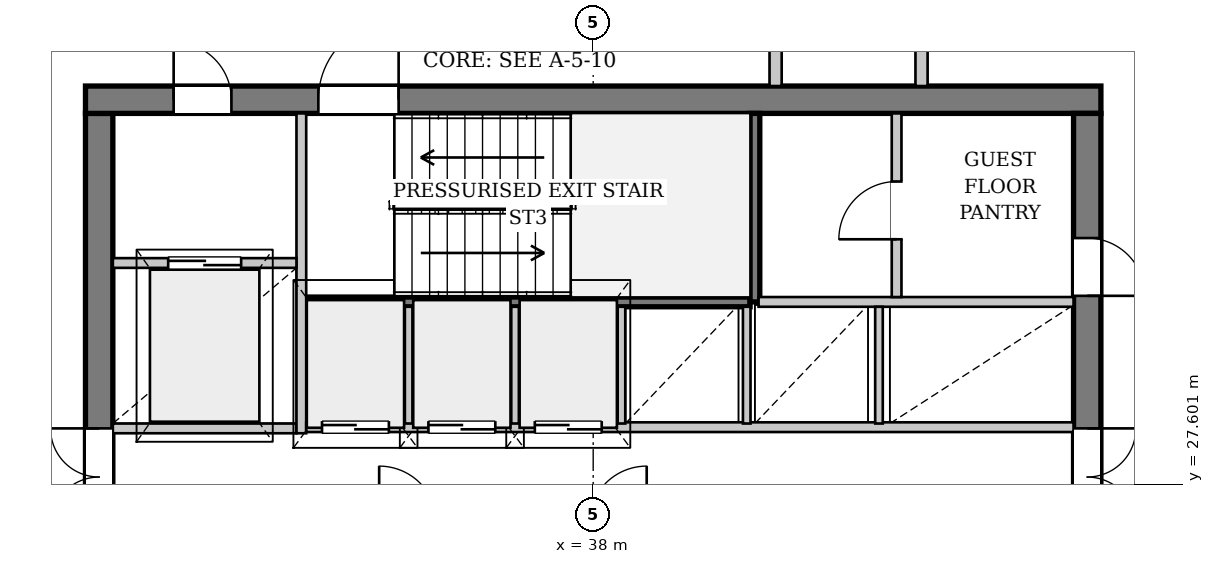
"""IFC4 building model, lengths in metres.
Left out: names, types, materials, properties, quantities, classifications, styles, units other than length and angle.
Written with IfcOpenShell. Run it as: python <this file> out.ifc"""

import sys

from ifc_helpers import new_model, si_unit, direction, frame, frame_2d, origin, place, context, subcontext, project, spatial, rectangle, extrude, source, transform, mapped, element, fill, save


model = new_model("IFC4")
c1 = context("Model", 3, precision=1e-05, world=origin(), true_north=direction((0.0, 1.0)))
c2 = subcontext(c1, "Body", "Model", "MODEL_VIEW")
j1 = project(units=[si_unit("LENGTHUNIT", "METRE"), si_unit("PLANEANGLEUNIT", "RADIAN")], contexts=[c1])
p1 = place(None, origin())
s1 = spatial("IfcSite", under=j1, at=p1, CompositionType="ELEMENT")
p2 = place(p1, origin())
s2 = spatial("IfcBuilding", under=s1, at=p2, CompositionType="ELEMENT")
p3 = place(p2, frame((0.0, 0.0, 230.9)))
s3 = spatial("IfcBuildingStorey", under=s2, at=p3, CompositionType="ELEMENT", Elevation=230.9)
p4 = place(p3, frame((15.504, 30.396, 0.0), z_axis=(0.0, 0.0, 1.0), x_axis=(0.869398698509, 0.494111225365, 0.0)))
e1 = element("IfcWall", 1, at=p4, inside=s3, PredefinedType="SOLIDWALL", context=c2, shape_type="SweptSolid", body=[
    extrude(rectangle(XDim=22.369, YDim=0.38, at=frame_2d((11.185, 0.0))), origin(), (0.0, 0.0, 1.0), 2.872),
])
p5 = place(p4, frame((5.163, 0.0, 0.502)))
e2 = element("IfcOpeningElement", 2, at=p5, cuts=e1, PredefinedType="OPENING", context=c2, shape_type="SweptSolid", body=[
    extrude(rectangle(XDim=2.2, YDim=2.25, at=frame_2d((1.1, 1.125))), frame((0.0, 0.2, 0.0), z_axis=(0.0, -1.0, 0.0), x_axis=(1.0, 0.0, 0.0)), (0.0, 0.0, 1.0), 0.4),
])
p6 = place(p4, frame((15.206, 0.0, 0.502)))
e3 = element("IfcOpeningElement", 3, at=p6, cuts=e1, PredefinedType="OPENING", context=c2, shape_type="SweptSolid", body=[
    extrude(rectangle(XDim=2.2, YDim=2.25, at=frame_2d((1.1, 1.125))), frame((0.0, 0.2, 0.0), z_axis=(0.0, -1.0, 0.0), x_axis=(1.0, 0.0, 0.0)), (0.0, 0.0, 1.0), 0.4),
])
p7 = place(p3, frame((29.875, 19.5, 0.0), z_axis=(0.0, 0.0, 1.0), x_axis=(0.0, 1.0, 0.0)))
e4 = element("IfcWall", 4, at=p7, inside=s3, PredefinedType="SHEAR", context=c2, shape_type="SweptSolid", body=[
    extrude(rectangle(XDim=14.2, YDim=0.45, at=frame_2d((7.1, 0.0))), origin(), (0.0, 0.0, 1.0), 3.38),
])
p8 = place(p7, frame((7.42, 0.0, 0.0)))
e5 = element("IfcOpeningElement", 5, at=p8, cuts=e4, PredefinedType="OPENING", context=c2, shape_type="SweptSolid", body=[
    extrude(rectangle(XDim=1.6, YDim=2.2, at=frame_2d((0.8, 1.1))), frame((0.0, 0.235, 0.0), z_axis=(0.0, -1.0, 0.0), x_axis=(1.0, 0.0, 0.0)), (0.0, 0.0, 1.0), 0.47),
])
p9 = place(p3, frame((29.65, 33.925, 0.0), z_axis=(0.0, 0.0, 1.0), x_axis=(1.0, 0.0, 0.0)))
e6 = element("IfcWall", 6, at=p9, inside=s3, PredefinedType="SHEAR", context=c2, shape_type="SweptSolid", body=[
    extrude(rectangle(XDim=16.7, YDim=0.45, at=frame_2d((8.35, 0.0))), origin(), (0.0, 0.0, 1.0), 3.38),
])
p10 = place(p9, frame((1.45, 0.0, 0.0)))
e7 = element("IfcOpeningElement", 7, at=p10, cuts=e6, PredefinedType="OPENING", context=c2, shape_type="SweptSolid", body=[
    extrude(rectangle(XDim=0.95, YDim=2.1, at=frame_2d((0.475, 1.05))), frame((0.0, 0.235, 0.0), z_axis=(0.0, -1.0, 0.0), x_axis=(1.0, 0.0, 0.0)), (0.0, 0.0, 1.0), 0.47),
])
p11 = place(p9, frame((3.83, 0.0, 0.0)))
e8 = element("IfcOpeningElement", 8, at=p11, cuts=e6, PredefinedType="OPENING", context=c2, shape_type="SweptSolid", body=[
    extrude(rectangle(XDim=1.32, YDim=2.2, at=frame_2d((0.66, 1.1))), frame((0.0, 0.235, 0.0), z_axis=(0.0, -1.0, 0.0), x_axis=(1.0, 0.0, 0.0)), (0.0, 0.0, 1.0), 0.47),
])
p12 = place(p3, frame((46.125, 33.7, 0.0), z_axis=(0.0, 0.0, 1.0), x_axis=(0.0, -1.0, 0.0)))
e9 = element("IfcWall", 9, at=p12, inside=s3, PredefinedType="SHEAR", context=c2, shape_type="SweptSolid", body=[
    extrude(rectangle(XDim=14.2, YDim=0.45, at=frame_2d((7.1, 0.0))), origin(), (0.0, 0.0, 1.0), 3.38),
])
p13 = place(p12, frame((5.18, 0.0, 0.0)))
e10 = element("IfcOpeningElement", 10, at=p13, cuts=e9, PredefinedType="OPENING", context=c2, shape_type="SweptSolid", body=[
    extrude(rectangle(XDim=1.6, YDim=2.2, at=frame_2d((0.8, 1.1))), frame((0.0, 0.235, 0.0), z_axis=(0.0, -1.0, 0.0), x_axis=(1.0, 0.0, 0.0)), (0.0, 0.0, 1.0), 0.47),
])
p14 = place(p12, frame((2.05, 0.0, 0.0)))
e11 = element("IfcOpeningElement", 11, at=p14, cuts=e9, PredefinedType="OPENING", context=c2, shape_type="SweptSolid", body=[
    extrude(rectangle(XDim=0.95, YDim=2.1, at=frame_2d((0.475, 1.05))), frame((0.0, 0.235, 0.0), z_axis=(0.0, -1.0, 0.0), x_axis=(1.0, 0.0, 0.0)), (0.0, 0.0, 1.0), 0.47),
])
p15 = place(p3, frame((33.28, 30.6, 0.0), z_axis=(0.0, 0.0, 1.0), x_axis=(1.0, 0.0, 0.0)))
e12 = element("IfcWall", 12, at=p15, inside=s3, PredefinedType="PARTITIONING", context=c2, shape_type="SweptSolid", body=[
    extrude(rectangle(XDim=7.3, YDim=0.16, at=frame_2d((3.65, 0.0))), origin(), (0.0, 0.0, 1.0), 3.38),
])
p16 = place(p3, frame((40.66, 30.6, 0.0), z_axis=(0.0, 0.0, 1.0), x_axis=(0.0, 1.0, 0.0)))
e13 = element("IfcWall", 13, at=p16, inside=s3, PredefinedType="PARTITIONING", context=c2, shape_type="SweptSolid", body=[
    extrude(rectangle(XDim=3.1, YDim=0.16, at=frame_2d((1.55, 0.0))), origin(), (0.0, 0.0, 1.0), 3.38),
])
p17 = place(p3, frame((30.1, 28.52, 0.0), z_axis=(0.0, 0.0, 1.0), x_axis=(1.0, 0.0, 0.0)))
e14 = element("IfcWall", 14, at=p17, inside=s3, PredefinedType="PARTITIONING", context=c2, shape_type="SweptSolid", body=[
    extrude(rectangle(XDim=3.02, YDim=0.16, at=frame_2d((1.51, 0.0))), origin(), (0.0, 0.0, 1.0), 3.38),
])
p18 = place(p3, frame((33.2, 28.44, 0.0), z_axis=(0.0, 0.0, 1.0), x_axis=(0.0, 1.0, 0.0)))
e15 = element("IfcWall", 15, at=p18, inside=s3, PredefinedType="PARTITIONING", context=c2, shape_type="SweptSolid", body=[
    extrude(rectangle(XDim=5.26, YDim=0.16, at=frame_2d((2.63, 0.0))), origin(), (0.0, 0.0, 1.0), 3.38),
])
p19 = place(p3, frame((30.1, 31.24, 0.0), z_axis=(0.0, 0.0, 1.0), x_axis=(1.0, 0.0, 0.0)))
e16 = element("IfcWall", 16, at=p19, inside=s3, PredefinedType="PARTITIONING", context=c2, shape_type="SweptSolid", body=[
    extrude(rectangle(XDim=3.02, YDim=0.16, at=frame_2d((1.51, 0.0))), origin(), (0.0, 0.0, 1.0), 3.38),
])
p20 = place(p19, frame((0.91, 0.0, 0.0)))
e17 = element("IfcOpeningElement", 17, at=p20, cuts=e16, PredefinedType="OPENING", context=c2, shape_type="SweptSolid", body=[
    extrude(rectangle(XDim=1.2, YDim=2.2, at=frame_2d((0.6, 1.1))), frame((0.0, 0.09, 0.0), z_axis=(0.0, -1.0, 0.0), x_axis=(1.0, 0.0, 0.0)), (0.0, 0.0, 1.0), 0.18),
])
p21 = place(p3, frame((33.28, 28.54, 0.0), z_axis=(0.0, 0.0, 1.0), x_axis=(1.0, 0.0, 0.0)))
e18 = element("IfcWall", 18, at=p21, inside=s3, PredefinedType="PARTITIONING", context=c2, shape_type="SweptSolid", body=[
    extrude(rectangle(XDim=12.62, YDim=0.16, at=frame_2d((6.31, 0.0))), origin(), (0.0, 0.0, 1.0), 3.38),
])
p22 = place(p21, frame((0.26, 0.0, 0.0)))
e19 = element("IfcOpeningElement", 19, at=p22, cuts=e18, PredefinedType="OPENING", context=c2, shape_type="SweptSolid", body=[
    extrude(rectangle(XDim=1.1, YDim=2.2, at=frame_2d((0.55, 1.1))), frame((0.0, 0.09, 0.0), z_axis=(0.0, -1.0, 0.0), x_axis=(1.0, 0.0, 0.0)), (0.0, 0.0, 1.0), 0.18),
])
p23 = place(p21, frame((2.01, 0.0, 0.0)))
e20 = element("IfcOpeningElement", 20, at=p23, cuts=e18, PredefinedType="OPENING", context=c2, shape_type="SweptSolid", body=[
    extrude(rectangle(XDim=1.1, YDim=2.2, at=frame_2d((0.55, 1.1))), frame((0.0, 0.09, 0.0), z_axis=(0.0, -1.0, 0.0), x_axis=(1.0, 0.0, 0.0)), (0.0, 0.0, 1.0), 0.18),
])
p24 = place(p21, frame((3.76, 0.0, 0.0)))
e21 = element("IfcOpeningElement", 21, at=p24, cuts=e18, PredefinedType="OPENING", context=c2, shape_type="SweptSolid", body=[
    extrude(rectangle(XDim=1.1, YDim=2.2, at=frame_2d((0.55, 1.1))), frame((0.0, 0.09, 0.0), z_axis=(0.0, -1.0, 0.0), x_axis=(1.0, 0.0, 0.0)), (0.0, 0.0, 1.0), 0.18),
])
p25 = place(p3, frame((40.72, 30.6, 0.0), z_axis=(0.0, 0.0, 1.0), x_axis=(1.0, 0.0, 0.0)))
e22 = element("IfcWall", 22, at=p25, inside=s3, PredefinedType="PARTITIONING", context=c2, shape_type="SweptSolid", body=[
    extrude(rectangle(XDim=5.18, YDim=0.16, at=frame_2d((2.59, 0.0))), origin(), (0.0, 0.0, 1.0), 3.38),
])
for number, where, z_axis, x_axis in (
    (23, (34.965, 28.6, 0.0), (0.0, 0.0, 1.0), (0.0, 1.0, 0.0)),
    (24, (36.715, 28.6, 0.0), (0.0, 0.0, 1.0), (0.0, 1.0, 0.0)),
    (25, (38.465, 28.6, 0.0), (0.0, 0.0, 1.0), (0.0, 1.0, 0.0)),
    (26, (40.525, 28.6, 0.0), (0.0, 0.0, 1.0), (0.0, 1.0, 0.0)),
    (27, (42.7, 28.6, 0.0), (0.0, 0.0, 1.0), (0.0, 1.0, 0.0)),
):
    element("IfcWall", number, at=place(p3, frame(where, z_axis=z_axis, x_axis=x_axis)), inside=s3, PredefinedType="PARTITIONING", context=c2, shape_type="SweptSolid", body=[
        extrude(rectangle(XDim=1.92, YDim=0.125, at=frame_2d((0.96, 0.0))), origin(), (0.0, 0.0, 1.0), 3.38),
    ])
p26 = place(p3, frame((42.99, 30.68, 0.0), z_axis=(0.0, 0.0, 1.0), x_axis=(0.0, 1.0, 0.0)))
e28 = element("IfcWall", 28, at=p26, inside=s3, PredefinedType="PARTITIONING", context=c2, shape_type="SweptSolid", body=[
    extrude(rectangle(XDim=3.02, YDim=0.16, at=frame_2d((1.51, 0.0))), origin(), (0.0, 0.0, 1.0), 3.38),
])
p27 = place(p26, frame((0.95, 0.0, 0.0)))
e29 = element("IfcOpeningElement", 29, at=p27, cuts=e28, PredefinedType="OPENING", context=c2, shape_type="SweptSolid", body=[
    extrude(rectangle(XDim=0.95, YDim=2.1, at=frame_2d((0.475, 1.05))), frame((0.0, 0.09, 0.0), z_axis=(0.0, -1.0, 0.0), x_axis=(1.0, 0.0, 0.0)), (0.0, 0.0, 1.0), 0.18),
])
for number, where, z_axis, x_axis in (
    (30, (41.0, 34.15, 0.0), (0.0, 0.0, 1.0), (0.0, 1.0, 0.0)),
    (31, (43.4, 34.15, 0.0), (0.0, 0.0, 1.0), (0.0, 1.0, 0.0)),
):
    element("IfcWall", number, at=place(p3, frame(where, z_axis=z_axis, x_axis=x_axis)), inside=s3, PredefinedType="PARTITIONING", context=c2, shape_type="SweptSolid", body=[
        extrude(rectangle(XDim=1.85, YDim=0.2, at=frame_2d((0.925, 0.0))), origin(), (0.0, 0.0, 1.0), 3.38),
    ])
m1 = source(origin(), c2, "Body", "SweptSolid", [
    extrude(rectangle(XDim=1.6, YDim=2.2, at=frame_2d((0.8, 1.1))), frame((0.0, 0.025, 0.0), z_axis=(0.0, -1.0, 0.0), x_axis=(1.0, 0.0, 0.0)), (0.0, 0.0, 1.0), 0.05),
])
p28 = place(p8, origin())
e32 = element("IfcDoor", 32, at=p28, inside=s3, OperationType="DOUBLE_DOOR_SINGLE_SWING", PredefinedType="DOOR", context=c2, shape_type="MappedRepresentation", body=[
    mapped(m1, transform((0.0, 0.0, 0.0), x_axis=(1.0, 0.0, 0.0), y_axis=(0.0, 1.0, 0.0), z_axis=(0.0, 0.0, 1.0), scale=1.0)),
])
fill(e5, e32)
m2 = source(origin(), c2, "Body", "SweptSolid", [
    extrude(rectangle(XDim=0.95, YDim=2.1, at=frame_2d((0.475, 1.05))), frame((0.0, 0.025, 0.0), z_axis=(0.0, -1.0, 0.0), x_axis=(1.0, 0.0, 0.0)), (0.0, 0.0, 1.0), 0.05),
])
p29 = place(p10, origin())
e33 = element("IfcDoor", 33, at=p29, inside=s3, OperationType="SINGLE_SWING_LEFT", PredefinedType="DOOR", context=c2, shape_type="MappedRepresentation", body=[
    mapped(m2, transform((0.0, 0.0, 0.0), x_axis=(1.0, 0.0, 0.0), y_axis=(0.0, 1.0, 0.0), z_axis=(0.0, 0.0, 1.0), scale=1.0)),
])
fill(e7, e33)
m3 = source(origin(), c2, "Body", "SweptSolid", [
    extrude(rectangle(XDim=1.32, YDim=2.2, at=frame_2d((0.66, 1.1))), frame((0.0, 0.025, 0.0), z_axis=(0.0, -1.0, 0.0), x_axis=(1.0, 0.0, 0.0)), (0.0, 0.0, 1.0), 0.05),
])
p30 = place(p11, origin())
e34 = element("IfcDoor", 34, at=p30, inside=s3, OperationType="SINGLE_SWING_RIGHT", PredefinedType="DOOR", context=c2, shape_type="MappedRepresentation", body=[
    mapped(m3, transform((0.0, 0.0, 0.0), x_axis=(1.0, 0.0, 0.0), y_axis=(0.0, 1.0, 0.0), z_axis=(0.0, 0.0, 1.0), scale=1.0)),
])
fill(e8, e34)
p31 = place(p13, origin())
e35 = element("IfcDoor", 35, at=p31, inside=s3, OperationType="DOUBLE_DOOR_SINGLE_SWING", PredefinedType="DOOR", context=c2, shape_type="MappedRepresentation", body=[
    mapped(m1, transform((0.0, 0.0, 0.0), x_axis=(1.0, 0.0, 0.0), y_axis=(0.0, 1.0, 0.0), z_axis=(0.0, 0.0, 1.0), scale=1.0)),
])
fill(e10, e35)
m4 = source(origin(), c2, "Body", "SweptSolid", [
    extrude(rectangle(XDim=1.2, YDim=2.2, at=frame_2d((0.6, 1.1))), frame((0.0, 0.025, 0.0), z_axis=(0.0, -1.0, 0.0), x_axis=(1.0, 0.0, 0.0)), (0.0, 0.0, 1.0), 0.05),
])
p32 = place(p20, origin())
e36 = element("IfcDoor", 36, at=p32, inside=s3, OperationType="DOUBLE_DOOR_SLIDING", PredefinedType="DOOR", context=c2, shape_type="MappedRepresentation", body=[
    mapped(m4, transform((0.0, 0.0, 0.0), x_axis=(1.0, 0.0, 0.0), y_axis=(0.0, 1.0, 0.0), z_axis=(0.0, 0.0, 1.0), scale=1.0)),
])
fill(e17, e36)
m5 = source(origin(), c2, "Body", "SweptSolid", [
    extrude(rectangle(XDim=1.1, YDim=2.2, at=frame_2d((0.55, 1.1))), frame((0.0, 0.025, 0.0), z_axis=(0.0, -1.0, 0.0), x_axis=(1.0, 0.0, 0.0)), (0.0, 0.0, 1.0), 0.05),
])
p33 = place(p22, origin())
e37 = element("IfcDoor", 37, at=p33, inside=s3, OperationType="DOUBLE_DOOR_SLIDING", PredefinedType="DOOR", context=c2, shape_type="MappedRepresentation", body=[
    mapped(m5, transform((0.0, 0.0, 0.0), x_axis=(1.0, 0.0, 0.0), y_axis=(0.0, 1.0, 0.0), z_axis=(0.0, 0.0, 1.0), scale=1.0)),
])
fill(e19, e37)
p34 = place(p23, origin())
e38 = element("IfcDoor", 38, at=p34, inside=s3, OperationType="DOUBLE_DOOR_SLIDING", PredefinedType="DOOR", context=c2, shape_type="MappedRepresentation", body=[
    mapped(m5, transform((0.0, 0.0, 0.0), x_axis=(1.0, 0.0, 0.0), y_axis=(0.0, 1.0, 0.0), z_axis=(0.0, 0.0, 1.0), scale=1.0)),
])
fill(e20, e38)
p35 = place(p24, origin())
e39 = element("IfcDoor", 39, at=p35, inside=s3, OperationType="DOUBLE_DOOR_SLIDING", PredefinedType="DOOR", context=c2, shape_type="MappedRepresentation", body=[
    mapped(m5, transform((0.0, 0.0, 0.0), x_axis=(1.0, 0.0, 0.0), y_axis=(0.0, 1.0, 0.0), z_axis=(0.0, 0.0, 1.0), scale=1.0)),
])
fill(e21, e39)
p36 = place(p27, origin())
e40 = element("IfcDoor", 40, at=p36, inside=s3, OperationType="SINGLE_SWING_LEFT", PredefinedType="DOOR", context=c2, shape_type="MappedRepresentation", body=[
    mapped(m2, transform((0.0, 0.0, 0.0), x_axis=(1.0, 0.0, 0.0), y_axis=(0.0, 1.0, 0.0), z_axis=(0.0, 0.0, 1.0), scale=1.0)),
])
fill(e29, e40)
p37 = place(p14, origin())
e41 = element("IfcDoor", 41, at=p37, inside=s3, OperationType="SINGLE_SWING_RIGHT", PredefinedType="DOOR", context=c2, shape_type="MappedRepresentation", body=[
    mapped(m2, transform((0.0, 0.0, 0.0), x_axis=(1.0, 0.0, 0.0), y_axis=(0.0, 1.0, 0.0), z_axis=(0.0, 0.0, 1.0), scale=1.0)),
])
fill(e11, e41)
save(model, sys.argv[1])
